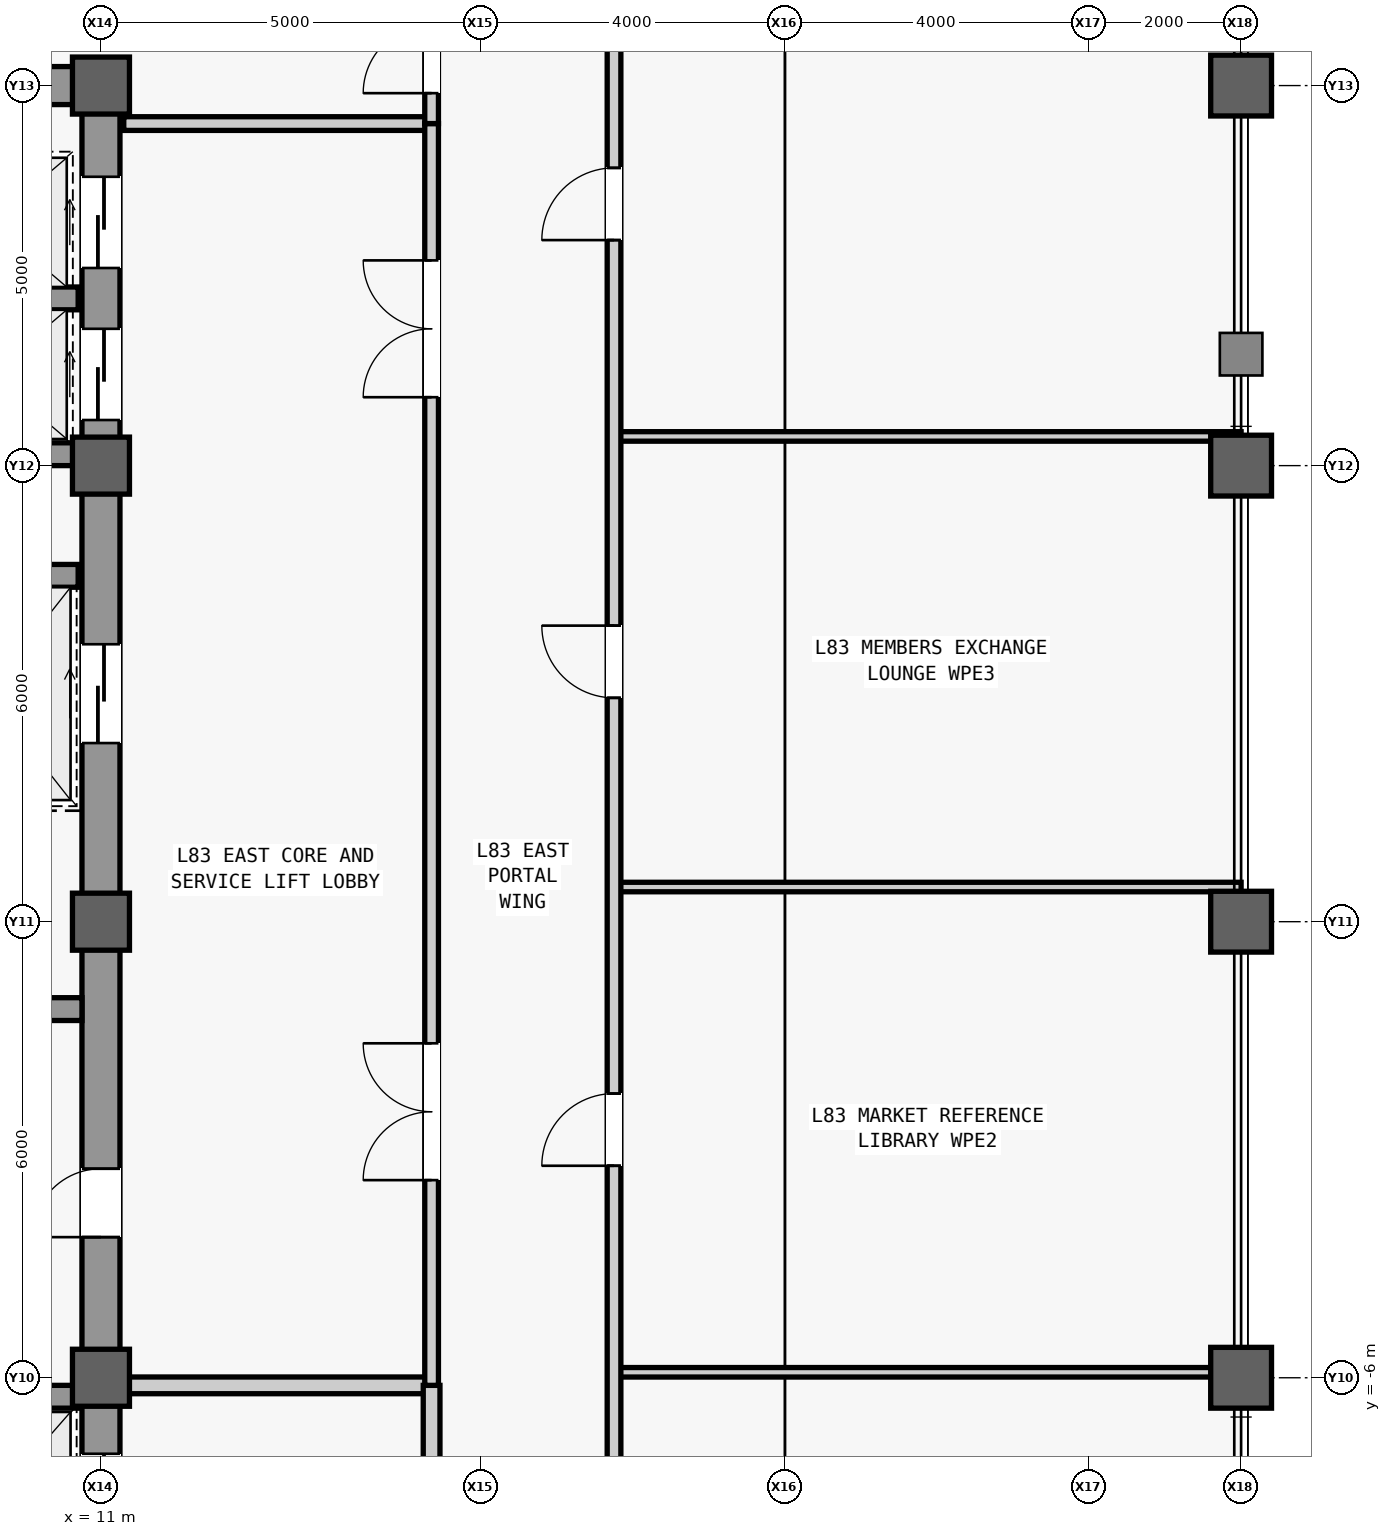
"""IFC4 building model, lengths in metres.
Left out: names, types, materials, properties, quantities, classifications, styles, units other than length and angle.
Written with IfcOpenShell. Run it as: python <this file> out.ifc"""

import sys

from ifc_helpers import new_model, si_unit, direction, frame, frame_2d, origin, origin_2d, place, context, subcontext, project, spatial, rectangle, hollow_rectangle, extrude, source, transform, mapped, element, fill, save


model = new_model("IFC4")
c1 = context("Model", 3, precision=1e-05, world=origin(), true_north=direction((0.0, 1.0)))
c2 = subcontext(c1, "Body", "Model", "MODEL_VIEW")
j1 = project(units=[si_unit("LENGTHUNIT", "METRE"), si_unit("PLANEANGLEUNIT", "RADIAN")], contexts=[c1])
p1 = place(None, origin())
s1 = spatial("IfcSite", under=j1, at=p1, CompositionType="ELEMENT")
p2 = place(p1, origin())
s2 = spatial("IfcBuilding", under=s1, at=p2, CompositionType="ELEMENT")
p3 = place(p2, frame((0.0, 0.0, 350.3)))
s3 = spatial("IfcBuildingStorey", under=s2, at=p3, CompositionType="ELEMENT", Elevation=350.3)
m1 = source(origin(), c2, "Body", "SweptSolid", [
    extrude(rectangle(XDim=22.0, YDim=0.5, at=frame_2d((11.0, 0.0))), origin(), (0.0, 0.0, 1.0), 3.74),
])
p4 = place(p3, frame((11.0, -11.0, 0.0), z_axis=(0.0, 0.0, 1.0), x_axis=(0.0, 1.0, 0.0)))
e1 = element("IfcWall", 1, at=p4, inside=s3, PredefinedType="SHEAR", context=c2, shape_type="MappedRepresentation", body=[
    mapped(m1, transform((0.0, 0.0, 0.0), scale=1.0)),
])
m2 = source(origin(), c2, "Body", "SweptSolid", [
    extrude(rectangle(XDim=1.1, YDim=2.2, at=frame_2d((0.55, 1.1))), frame((0.0, 0.26, 0.0), z_axis=(0.0, -1.0, 0.0), x_axis=(1.0, 0.0, 0.0)), (0.0, 0.0, 1.0), 0.52),
])
p5 = place(p4, frame((0.8, 0.0, 0.0)))
e2 = element("IfcOpeningElement", 2, at=p5, cuts=e1, PredefinedType="OPENING", context=c2, shape_type="MappedRepresentation", body=[
    mapped(m2, transform((0.0, 0.0, 0.0), scale=1.0)),
])
m3 = source(origin(), c2, "Body", "SweptSolid", [
    extrude(rectangle(XDim=0.9, YDim=2.15, at=frame_2d((0.45, 1.075))), frame((0.0, 0.26, 0.0), z_axis=(0.0, -1.0, 0.0), x_axis=(1.0, 0.0, 0.0)), (0.0, 0.0, 1.0), 0.52),
])
p6 = place(p4, frame((6.85, 0.0, 0.0)))
e3 = element("IfcOpeningElement", 3, at=p6, cuts=e1, PredefinedType="OPENING", context=c2, shape_type="MappedRepresentation", body=[
    mapped(m3, transform((0.0, 0.0, 0.0), scale=1.0)),
])
m4 = source(origin(), c2, "Body", "SweptSolid", [
    extrude(rectangle(XDim=1.2, YDim=2.3, at=frame_2d((0.6, 1.15))), frame((0.0, 0.26, 0.0), z_axis=(0.0, -1.0, 0.0), x_axis=(1.0, 0.0, 0.0)), (0.0, 0.0, 1.0), 0.52),
])
p7 = place(p4, frame((17.6, 0.0, 0.0)))
e4 = element("IfcOpeningElement", 4, at=p7, cuts=e1, PredefinedType="OPENING", context=c2, shape_type="MappedRepresentation", body=[
    mapped(m4, transform((0.0, 0.0, 0.0), scale=1.0)),
])
p8 = place(p4, frame((19.6, 0.0, 0.0)))
e5 = element("IfcOpeningElement", 5, at=p8, cuts=e1, PredefinedType="OPENING", context=c2, shape_type="MappedRepresentation", body=[
    mapped(m4, transform((0.0, 0.0, 0.0), scale=1.0)),
])
m5 = source(origin(), c2, "Body", "SweptSolid", [
    extrude(rectangle(XDim=1.3, YDim=2.3, at=frame_2d((0.65, 1.15))), frame((0.0, 0.26, 0.0), z_axis=(0.0, -1.0, 0.0), x_axis=(1.0, 0.0, 0.0)), (0.0, 0.0, 1.0), 0.52),
])
p9 = place(p4, frame((2.7, 0.0, 0.0)))
e6 = element("IfcOpeningElement", 6, at=p9, cuts=e1, PredefinedType="OPENING", context=c2, shape_type="MappedRepresentation", body=[
    mapped(m5, transform((0.0, 0.0, 0.0), scale=1.0)),
])
p10 = place(p4, frame((13.35, 0.0, 0.0)))
e7 = element("IfcOpeningElement", 7, at=p10, cuts=e1, PredefinedType="OPENING", context=c2, shape_type="MappedRepresentation", body=[
    mapped(m5, transform((0.0, 0.0, 0.0), scale=1.0)),
])
m6 = source(origin(), c2, "Body", "SweptSolid", [
    extrude(rectangle(XDim=5.9, YDim=0.5, at=frame_2d((2.95, 0.0))), origin(), (0.0, 0.0, 1.0), 3.74),
])
p11 = place(p3, frame((4.85, 11.0, 0.0), z_axis=(0.0, 0.0, 1.0), x_axis=(1.0, 0.0, 0.0)))
e8 = element("IfcWall", 8, at=p11, inside=s3, PredefinedType="SHEAR", context=c2, shape_type="MappedRepresentation", body=[
    mapped(m6, transform((0.0, 0.0, 0.0), scale=1.0)),
])
m7 = source(origin(), c2, "Body", "SweptSolid", [
    extrude(rectangle(XDim=1.05, YDim=2.2, at=frame_2d((0.525, 1.1))), frame((0.0, 0.26, 0.0), z_axis=(0.0, -1.0, 0.0), x_axis=(1.0, 0.0, 0.0)), (0.0, 0.0, 1.0), 0.52),
])
p12 = place(p11, frame((1.375, 0.0, 0.0)))
e9 = element("IfcOpeningElement", 9, at=p12, cuts=e8, PredefinedType="OPENING", context=c2, shape_type="MappedRepresentation", body=[
    mapped(m7, transform((0.0, 0.0, 0.0), scale=1.0)),
])
m8 = source(origin(), c2, "Body", "SweptSolid", [
    extrude(rectangle(XDim=5.65, YDim=0.3, at=frame_2d((2.825, 0.0))), origin(), (0.0, 0.0, 1.0), 3.74),
])
p13 = place(p3, frame((5.1, -1.15, 0.0), z_axis=(0.0, 0.0, 1.0), x_axis=(1.0, 0.0, 0.0)))
e10 = element("IfcWall", 10, at=p13, inside=s3, PredefinedType="SHEAR", context=c2, shape_type="MappedRepresentation", body=[
    mapped(m8, transform((0.0, 0.0, 0.0), scale=1.0)),
])
m9 = source(origin(), c2, "Body", "SweptSolid", [
    extrude(rectangle(XDim=0.75, YDim=0.75, at=origin_2d()), origin(), (0.0, 0.0, 1.0), 4.0),
])
for number, where, z_axis, x_axis in (
    (11, (11.0, -6.0, 0.0), (0.0, 0.0, 1.0), (1.0, 0.0, 0.0)),
    (12, (11.0, 0.0, 0.0), (0.0, 0.0, 1.0), (1.0, 0.0, 0.0)),
    (13, (11.0, 6.0, 0.0), (0.0, 0.0, 1.0), (1.0, 0.0, 0.0)),
    (14, (11.0, 11.0, 0.0), (0.0, 0.0, 1.0), (1.0, 0.0, 0.0)),
):
    element("IfcColumn", number, at=place(p3, frame(where, z_axis=z_axis, x_axis=x_axis)), inside=s3, PredefinedType="COLUMN", context=c2, shape_type="MappedRepresentation", body=[
        mapped(m9, transform((0.0, 0.0, 0.0), scale=1.0)),
    ])
m10 = source(origin(), c2, "Body", "SweptSolid", [
    extrude(hollow_rectangle(XDim=0.8, YDim=0.8, WallThickness=0.045, at=origin_2d()), origin(), (0.0, 0.0, 1.0), 4.0),
])
for number, where, z_axis, x_axis in (
    (15, (26.0, -6.0, 0.0), (0.0, 0.0, 1.0), (1.0, 0.0, 0.0)),
    (16, (26.0, 0.0, 0.0), (0.0, 0.0, 1.0), (1.0, 0.0, 0.0)),
    (17, (26.0, 6.0, 0.0), (0.0, 0.0, 1.0), (1.0, 0.0, 0.0)),
    (18, (26.0, 11.0, 0.0), (0.0, 0.0, 1.0), (1.0, 0.0, 0.0)),
):
    element("IfcColumn", number, at=place(p3, frame(where, z_axis=z_axis, x_axis=x_axis)), inside=s3, PredefinedType="COLUMN", context=c2, shape_type="MappedRepresentation", body=[
        mapped(m10, transform((0.0, 0.0, 0.0), scale=1.0)),
    ])
m11 = source(origin(), c2, "Body", "SweptSolid", [
    extrude(rectangle(XDim=2.2, YDim=0.3, at=frame_2d((1.1, 0.0))), origin(), (0.0, 0.0, 1.0), 3.74),
])
p14 = place(p3, frame((8.5, -6.25, 0.0), z_axis=(0.0, 0.0, 1.0), x_axis=(1.0, 0.0, 0.0)))
e19 = element("IfcWall", 19, at=p14, inside=s3, PredefinedType="SHEAR", context=c2, shape_type="MappedRepresentation", body=[
    mapped(m11, transform((0.0, 0.0, 0.0), scale=1.0)),
])
m12 = source(origin(), c2, "Body", "SweptSolid", [
    extrude(rectangle(XDim=2.3, YDim=0.3, at=frame_2d((1.15, 0.0))), origin(), (0.0, 0.0, 1.0), 3.74),
])
for number, where, z_axis, x_axis in (
    (20, (8.4, 4.55, 0.0), (0.0, 0.0, 1.0), (1.0, 0.0, 0.0)),
    (21, (8.4, 6.15, 0.0), (0.0, 0.0, 1.0), (1.0, 0.0, 0.0)),
    (22, (8.4, 8.2, 0.0), (0.0, 0.0, 1.0), (1.0, 0.0, 0.0)),
):
    element("IfcWall", number, at=place(p3, frame(where, z_axis=z_axis, x_axis=x_axis)), inside=s3, PredefinedType="SHEAR", context=c2, shape_type="MappedRepresentation", body=[
        mapped(m12, transform((0.0, 0.0, 0.0), scale=1.0)),
    ])
m13 = source(origin(), c2, "Body", "SweptSolid", [
    extrude(rectangle(XDim=4.05, YDim=0.22, at=frame_2d((2.025, 0.0))), origin(), (0.0, 0.0, 1.0), 3.124),
])
p15 = place(p3, frame((11.3, -6.1, 0.0), z_axis=(0.0, 0.0, 1.0), x_axis=(1.0, 0.0, 0.0)))
e23 = element("IfcWall", 23, at=p15, inside=s3, PredefinedType="PARTITIONING", context=c2, shape_type="MappedRepresentation", body=[
    mapped(m13, transform((0.0, 0.0, 0.0), scale=1.0)),
])
m14 = source(origin(), c2, "Body", "SweptSolid", [
    extrude(rectangle(XDim=4.4, YDim=0.22, at=frame_2d((2.2, 0.0))), origin(), (0.0, 0.0, 1.0), 3.74),
])
p16 = place(p3, frame((15.35, -10.5, 0.0), z_axis=(0.0, 0.0, 1.0), x_axis=(0.0, 1.0, 0.0)))
e24 = element("IfcWall", 24, at=p16, inside=s3, PredefinedType="PARTITIONING", context=c2, shape_type="MappedRepresentation", body=[
    mapped(m14, transform((0.0, 0.0, 0.0), scale=1.0)),
])
m15 = source(origin(), c2, "Body", "SweptSolid", [
    extrude(rectangle(XDim=1.2, YDim=2.2, at=frame_2d((0.6, 1.1))), frame((0.0, 0.12, 0.0), z_axis=(0.0, -1.0, 0.0), x_axis=(1.0, 0.0, 0.0)), (0.0, 0.0, 1.0), 0.24),
])
p17 = place(p16, frame((1.6, 0.0, 0.0)))
e25 = element("IfcOpeningElement", 25, at=p17, cuts=e24, PredefinedType="OPENING", context=c2, shape_type="MappedRepresentation", body=[
    mapped(m15, transform((0.0, 0.0, 0.0), scale=1.0)),
])
m16 = source(origin(), c2, "Body", "SweptSolid", [
    extrude(rectangle(XDim=4.05, YDim=0.18, at=frame_2d((2.025, 0.0))), origin(), (0.0, 0.0, 1.0), 3.74),
])
p18 = place(p3, frame((11.3, 10.5, 0.0), z_axis=(0.0, 0.0, 1.0), x_axis=(1.0, 0.0, 0.0)))
e26 = element("IfcWall", 26, at=p18, inside=s3, PredefinedType="PARTITIONING", context=c2, shape_type="MappedRepresentation", body=[
    mapped(m16, transform((0.0, 0.0, 0.0), scale=1.0)),
])
m17 = source(origin(), c2, "Body", "SweptSolid", [
    extrude(rectangle(XDim=16.6, YDim=0.18, at=frame_2d((8.3, 0.0))), origin(), (0.0, 0.0, 1.0), 3.74),
])
p19 = place(p3, frame((15.35, -6.1, 0.0), z_axis=(0.0, 0.0, 1.0), x_axis=(0.0, 1.0, 0.0)))
e27 = element("IfcWall", 27, at=p19, inside=s3, PredefinedType="PARTITIONING", context=c2, shape_type="MappedRepresentation", body=[
    mapped(m17, transform((0.0, 0.0, 0.0), scale=1.0)),
])
m18 = source(origin(), c2, "Body", "SweptSolid", [
    extrude(rectangle(XDim=1.8, YDim=2.25, at=frame_2d((0.9, 1.125))), frame((0.0, 0.1, 0.0), z_axis=(0.0, -1.0, 0.0), x_axis=(1.0, 0.0, 0.0)), (0.0, 0.0, 1.0), 0.2),
])
p20 = place(p19, frame((2.7, 0.0, 0.0)))
e28 = element("IfcOpeningElement", 28, at=p20, cuts=e27, PredefinedType="OPENING", context=c2, shape_type="MappedRepresentation", body=[
    mapped(m18, transform((0.0, 0.0, 0.0), scale=1.0)),
])
p21 = place(p19, frame((13.0, 0.0, 0.0)))
e29 = element("IfcOpeningElement", 29, at=p21, cuts=e27, PredefinedType="OPENING", context=c2, shape_type="MappedRepresentation", body=[
    mapped(m18, transform((0.0, 0.0, 0.0), scale=1.0)),
])
m19 = source(origin(), c2, "Body", "SweptSolid", [
    extrude(rectangle(XDim=2.6, YDim=0.18, at=frame_2d((1.3, 0.0))), origin(), (0.0, 0.0, 1.0), 3.74),
])
p22 = place(p3, frame((15.35, 10.5, 0.0), z_axis=(0.0, 0.0, 1.0), x_axis=(0.0, 1.0, 0.0)))
e30 = element("IfcWall", 30, at=p22, inside=s3, PredefinedType="PARTITIONING", context=c2, shape_type="MappedRepresentation", body=[
    mapped(m19, transform((0.0, 0.0, 0.0), scale=1.0)),
])
p23 = place(p22, frame((0.4, 0.0, 0.0)))
e31 = element("IfcOpeningElement", 31, at=p23, cuts=e30, PredefinedType="OPENING", context=c2, shape_type="MappedRepresentation", body=[
    mapped(m18, transform((0.0, 0.0, 0.0), scale=1.0)),
])
m20 = source(origin(), c2, "Body", "SweptSolid", [
    extrude(rectangle(XDim=8.25, YDim=0.125, at=frame_2d((4.125, 0.0))), origin(), (0.0, 0.0, 1.0), 3.124),
])
p24 = place(p3, frame((17.75, -5.928, 0.0), z_axis=(0.0, 0.0, 1.0), x_axis=(1.0, 0.0, 0.0)))
e32 = element("IfcWall", 32, at=p24, inside=s3, PredefinedType="PARTITIONING", context=c2, shape_type="MappedRepresentation", body=[
    mapped(m20, transform((0.0, 0.0, 0.0), scale=1.0)),
])
m21 = source(origin(), c2, "Body", "SweptSolid", [
    extrude(rectangle(XDim=8.25, YDim=0.125, at=frame_2d((4.125, 0.0))), origin(), (0.0, 0.0, 1.0), 3.74),
])
for number, where, z_axis, x_axis in (
    (33, (17.75, 0.456, 0.0), (0.0, 0.0, 1.0), (1.0, 0.0, 0.0)),
    (34, (17.75, 6.384, 0.0), (0.0, 0.0, 1.0), (1.0, 0.0, 0.0)),
):
    element("IfcWall", number, at=place(p3, frame(where, z_axis=z_axis, x_axis=x_axis)), inside=s3, PredefinedType="PARTITIONING", context=c2, shape_type="MappedRepresentation", body=[
        mapped(m21, transform((0.0, 0.0, 0.0), scale=1.0)),
    ])
m22 = source(origin(), c2, "Body", "SweptSolid", [
    extrude(rectangle(XDim=40.0, YDim=0.18, at=frame_2d((20.0, 0.0))), origin(), (0.0, 0.0, 1.0), 3.74),
])
p25 = place(p3, frame((17.75, -20.0, 0.0), z_axis=(0.0, 0.0, 1.0), x_axis=(0.0, 1.0, 0.0)))
e35 = element("IfcWall", 35, at=p25, inside=s3, PredefinedType="PARTITIONING", context=c2, shape_type="MappedRepresentation", body=[
    mapped(m22, transform((0.0, 0.0, 0.0), scale=1.0)),
])
m23 = source(origin(), c2, "Body", "SweptSolid", [
    extrude(rectangle(XDim=0.95, YDim=2.15, at=frame_2d((0.475, 1.075))), frame((0.0, 0.1, 0.0), z_axis=(0.0, -1.0, 0.0), x_axis=(1.0, 0.0, 0.0)), (0.0, 0.0, 1.0), 0.2),
])
p26 = place(p25, frame((11.161, 0.0, 0.0)))
e36 = element("IfcOpeningElement", 36, at=p26, cuts=e35, PredefinedType="OPENING", context=c2, shape_type="MappedRepresentation", body=[
    mapped(m23, transform((0.0, 0.0, 0.0), scale=1.0)),
])
p27 = place(p25, frame((16.789, 0.0, 0.0)))
e37 = element("IfcOpeningElement", 37, at=p27, cuts=e35, PredefinedType="OPENING", context=c2, shape_type="MappedRepresentation", body=[
    mapped(m23, transform((0.0, 0.0, 0.0), scale=1.0)),
])
p28 = place(p25, frame((22.945, 0.0, 0.0)))
e38 = element("IfcOpeningElement", 38, at=p28, cuts=e35, PredefinedType="OPENING", context=c2, shape_type="MappedRepresentation", body=[
    mapped(m23, transform((0.0, 0.0, 0.0), scale=1.0)),
])
p29 = place(p25, frame((28.967, 0.0, 0.0)))
e39 = element("IfcOpeningElement", 39, at=p29, cuts=e35, PredefinedType="OPENING", context=c2, shape_type="MappedRepresentation", body=[
    mapped(m23, transform((0.0, 0.0, 0.0), scale=1.0)),
])
m24 = source(origin(), c2, "Body", "SweptSolid", [
    extrude(rectangle(XDim=0.9, YDim=2.15, at=frame_2d((0.45, 1.075))), frame((0.0, 0.025, 0.0), z_axis=(0.0, -1.0, 0.0), x_axis=(1.0, 0.0, 0.0)), (0.0, 0.0, 1.0), 0.05),
])
p30 = place(p6, origin())
e40 = element("IfcDoor", 40, at=p30, inside=s3, OperationType="SINGLE_SWING_LEFT", PredefinedType="DOOR", context=c2, shape_type="MappedRepresentation", body=[
    mapped(m24, transform((0.0, 0.0, 0.0), scale=1.0)),
])
fill(e3, e40)
m25 = source(origin(), c2, "Body", "SweptSolid", [
    extrude(rectangle(XDim=1.8, YDim=2.25, at=frame_2d((0.9, 1.125))), frame((0.0, 0.025, 0.0), z_axis=(0.0, -1.0, 0.0), x_axis=(1.0, 0.0, 0.0)), (0.0, 0.0, 1.0), 0.05),
])
p31 = place(p20, origin())
e41 = element("IfcDoor", 41, at=p31, inside=s3, OperationType="SINGLE_SWING_RIGHT", PredefinedType="DOOR", context=c2, shape_type="MappedRepresentation", body=[
    mapped(m25, transform((0.0, 0.0, 0.0), scale=1.0)),
])
fill(e28, e41)
p32 = place(p21, origin())
e42 = element("IfcDoor", 42, at=p32, inside=s3, OperationType="SINGLE_SWING_LEFT", PredefinedType="DOOR", context=c2, shape_type="MappedRepresentation", body=[
    mapped(m25, transform((0.0, 0.0, 0.0), scale=1.0)),
])
fill(e29, e42)
p33 = place(p23, origin())
e43 = element("IfcDoor", 43, at=p33, inside=s3, OperationType="DOUBLE_DOOR_SINGLE_SWING", PredefinedType="DOOR", context=c2, shape_type="MappedRepresentation", body=[
    mapped(m25, transform((0.0, 0.0, 0.0), scale=1.0)),
])
fill(e31, e43)
m26 = source(origin(), c2, "Body", "SweptSolid", [
    extrude(rectangle(XDim=0.95, YDim=2.15, at=frame_2d((0.475, 1.075))), frame((0.0, 0.025, 0.0), z_axis=(0.0, -1.0, 0.0), x_axis=(1.0, 0.0, 0.0)), (0.0, 0.0, 1.0), 0.05),
])
p34 = place(p27, origin())
e44 = element("IfcDoor", 44, at=p34, inside=s3, OperationType="SINGLE_SWING_LEFT", PredefinedType="DOOR", context=c2, shape_type="MappedRepresentation", body=[
    mapped(m26, transform((0.0, 0.0, 0.0), scale=1.0)),
])
fill(e37, e44)
p35 = place(p28, origin())
e45 = element("IfcDoor", 45, at=p35, inside=s3, OperationType="SINGLE_SWING_RIGHT", PredefinedType="DOOR", context=c2, shape_type="MappedRepresentation", body=[
    mapped(m26, transform((0.0, 0.0, 0.0), scale=1.0)),
])
fill(e38, e45)
p36 = place(p29, origin())
e46 = element("IfcDoor", 46, at=p36, inside=s3, OperationType="SINGLE_SWING_LEFT", PredefinedType="DOOR", context=c2, shape_type="MappedRepresentation", body=[
    mapped(m26, transform((0.0, 0.0, 0.0), scale=1.0)),
])
fill(e39, e46)
m27 = source(origin(), c2, "Body", "SweptSolid", [
    extrude(rectangle(XDim=1.2, YDim=2.3, at=frame_2d((0.6, 1.15))), frame((0.0, 0.025, 0.0), z_axis=(0.0, -1.0, 0.0), x_axis=(1.0, 0.0, 0.0)), (0.0, 0.0, 1.0), 0.05),
])
p37 = place(p7, origin())
e47 = element("IfcDoor", 47, at=p37, inside=s3, OperationType="SLIDING_TO_LEFT", PredefinedType="DOOR", context=c2, shape_type="MappedRepresentation", body=[
    mapped(m27, transform((0.0, 0.0, 0.0), scale=1.0)),
])
fill(e4, e47)
p38 = place(p8, origin())
e48 = element("IfcDoor", 48, at=p38, inside=s3, OperationType="SLIDING_TO_LEFT", PredefinedType="DOOR", context=c2, shape_type="MappedRepresentation", body=[
    mapped(m27, transform((0.0, 0.0, 0.0), scale=1.0)),
])
fill(e5, e48)
m28 = source(origin(), c2, "Body", "SweptSolid", [
    extrude(rectangle(XDim=1.3, YDim=2.3, at=frame_2d((0.65, 1.15))), frame((0.0, 0.025, 0.0), z_axis=(0.0, -1.0, 0.0), x_axis=(1.0, 0.0, 0.0)), (0.0, 0.0, 1.0), 0.05),
])
p39 = place(p9, origin())
e49 = element("IfcDoor", 49, at=p39, inside=s3, OperationType="SLIDING_TO_LEFT", PredefinedType="DOOR", context=c2, shape_type="MappedRepresentation", body=[
    mapped(m28, transform((0.0, 0.0, 0.0), scale=1.0)),
])
fill(e6, e49)
p40 = place(p10, origin())
e50 = element("IfcDoor", 50, at=p40, inside=s3, OperationType="SLIDING_TO_LEFT", PredefinedType="DOOR", context=c2, shape_type="MappedRepresentation", body=[
    mapped(m28, transform((0.0, 0.0, 0.0), scale=1.0)),
])
fill(e7, e50)
save(model, sys.argv[1])
